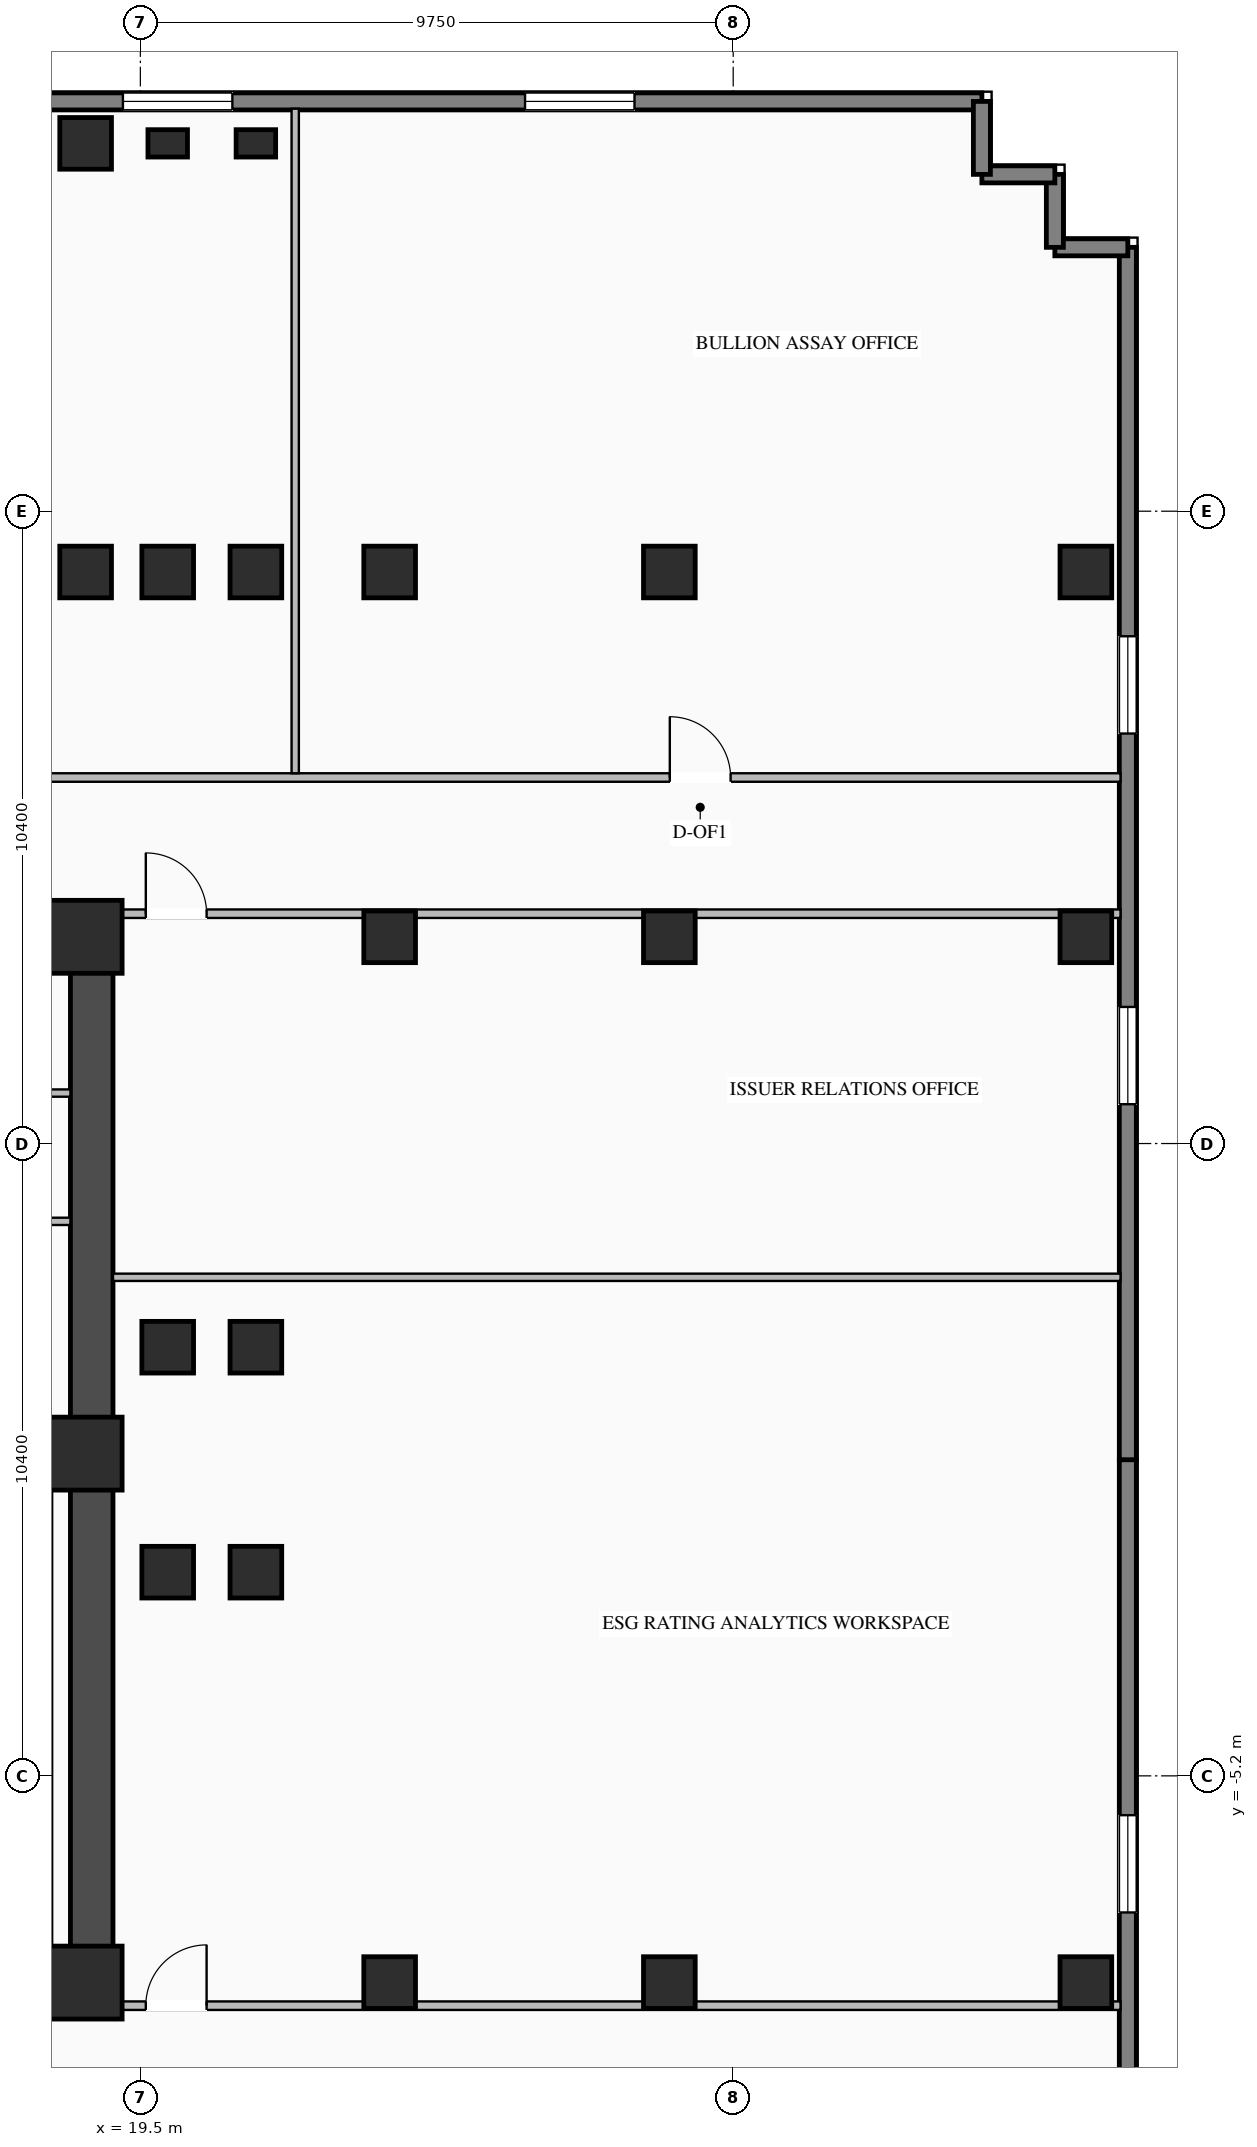
"""IFC4 building model, lengths in metres.
Left out: names, types, materials, properties, quantities, classifications, styles, units other than length and angle.
Written with IfcOpenShell. Run it as: python <this file> out.ifc"""

import sys

from ifc_helpers import new_model, si_unit, direction, frame, frame_2d, origin, origin_2d, place, context, subcontext, project, spatial, rectangle, i_section, extrude, element, fill, save


model = new_model("IFC4")
c1 = context("Model", 3, precision=1e-05, world=origin(), true_north=direction((0.0, 1.0)))
c2 = subcontext(c1, "Body", "Model", "MODEL_VIEW")
j1 = project(units=[si_unit("LENGTHUNIT", "METRE"), si_unit("PLANEANGLEUNIT", "RADIAN")], contexts=[c1])
p1 = place(None, origin())
s1 = spatial("IfcSite", under=j1, at=p1, CompositionType="ELEMENT")
p2 = place(p1, origin())
s2 = spatial("IfcBuilding", under=s1, at=p2, CompositionType="ELEMENT")
p3 = place(p2, frame((0.0, 0.0, 41.55)))
s3 = spatial("IfcBuildingStorey", under=s2, at=p3, CompositionType="ELEMENT", Elevation=41.55)
p4 = place(p3, frame((8.8, -8.7, 0.0), z_axis=(0.0, 0.0, 1.0), x_axis=(1.0, 0.0, 0.0)))
e1 = element("IfcWall", 1, at=p4, inside=s3, PredefinedType="SHEAR", context=c2, shape_type="SweptSolid", body=[
    extrude(rectangle(XDim=10.25, YDim=0.7, at=frame_2d((5.125, 0.0))), origin(), (0.0, 0.0, 1.0), 3.27),
])
p5 = place(p3, frame((8.8, 8.7, 0.0), z_axis=(0.0, 0.0, 1.0), x_axis=(1.0, 0.0, 0.0)))
e2 = element("IfcWall", 2, at=p5, inside=s3, PredefinedType="SHEAR", context=c2, shape_type="SweptSolid", body=[
    extrude(rectangle(XDim=10.25, YDim=0.7, at=frame_2d((5.125, 0.0))), origin(), (0.0, 0.0, 1.0), 3.27),
])
p6 = place(p5, frame((3.25, 0.0, 0.0)))
e3 = element("IfcOpeningElement", 3, at=p6, cuts=e2, PredefinedType="OPENING", context=c2, shape_type="SweptSolid", body=[
    extrude(rectangle(XDim=1.4, YDim=2.05, at=frame_2d((0.7, 1.025))), frame((0.0, 0.36, 0.0), z_axis=(0.0, -1.0, 0.0), x_axis=(1.0, 0.0, 0.0)), (0.0, 0.0, 1.0), 0.72),
])
p7 = place(p3, frame((18.7, -8.35, 0.0), z_axis=(0.0, 0.0, 1.0), x_axis=(0.0, 1.0, 0.0)))
e4 = element("IfcWall", 4, at=p7, inside=s3, PredefinedType="SHEAR", context=c2, shape_type="SweptSolid", body=[
    extrude(rectangle(XDim=16.7, YDim=0.7, at=frame_2d((8.35, 0.0))), origin(), (0.0, 0.0, 1.0), 3.27),
])
for number, where, z_axis, x_axis in (
    (5, (18.6, -8.6, 0.0), (0.0, 0.0, 1.0), (1.0, 0.0, 0.0)),
    (6, (18.6, 0.1, 0.0), (0.0, 0.0, 1.0), (1.0, 0.0, 0.0)),
    (7, (18.6, 8.6, 0.0), (0.0, 0.0, 1.0), (1.0, 0.0, 0.0)),
):
    element("IfcColumn", number, at=place(p3, frame(where, z_axis=z_axis, x_axis=x_axis)), inside=s3, PredefinedType="COLUMN", context=c2, shape_type="SweptSolid", body=[
        extrude(rectangle(XDim=1.2, YDim=1.2, at=origin_2d()), origin(), (0.0, 0.0, 1.0), 3.45),
    ])
for number, where, z_axis, x_axis in (
    (8, (18.6, 14.6, 0.0), (0.0, 0.0, 1.0), (1.0, 0.0, 0.0)),
    (9, (19.95, 14.6, 0.0), (0.0, 0.0, 1.0), (1.0, 0.0, 0.0)),
    (10, (21.4, 14.6, 0.0), (0.0, 0.0, 1.0), (1.0, 0.0, 0.0)),
    (11, (19.95, -1.85, 0.0), (0.0, 0.0, 1.0), (1.0, 0.0, 0.0)),
    (12, (19.95, 1.85, 0.0), (0.0, 0.0, 1.0), (1.0, 0.0, 0.0)),
    (13, (21.4, -1.85, 0.0), (0.0, 0.0, 1.0), (1.0, 0.0, 0.0)),
    (14, (21.4, 1.85, 0.0), (0.0, 0.0, 1.0), (1.0, 0.0, 0.0)),
    (15, (23.6, -8.6, 0.0), (0.0, 0.0, 1.0), (1.0, 0.0, 0.0)),
    (16, (23.6, 8.6, 0.0), (0.0, 0.0, 1.0), (1.0, 0.0, 0.0)),
    (17, (23.6, 14.6, 0.0), (0.0, 0.0, 1.0), (1.0, 0.0, 0.0)),
    (18, (28.2, -8.6, 0.0), (0.0, 0.0, 1.0), (1.0, 0.0, 0.0)),
    (19, (28.2, 8.6, 0.0), (0.0, 0.0, 1.0), (1.0, 0.0, 0.0)),
    (20, (28.2, 14.6, 0.0), (0.0, 0.0, 1.0), (1.0, 0.0, 0.0)),
    (21, (18.6, 21.65, 0.0), (0.0, 0.0, 1.0), (1.0, 0.0, 0.0)),
    (22, (35.05, -8.6, 0.0), (0.0, 0.0, 1.0), (1.0, 0.0, 0.0)),
    (23, (35.05, 8.6, 0.0), (0.0, 0.0, 1.0), (1.0, 0.0, 0.0)),
    (24, (35.05, 14.6, 0.0), (0.0, 0.0, 1.0), (1.0, 0.0, 0.0)),
):
    element("IfcColumn", number, at=place(p3, frame(where, z_axis=z_axis, x_axis=x_axis)), inside=s3, PredefinedType="COLUMN", context=c2, shape_type="SweptSolid", body=[
        extrude(i_section(OverallWidth=0.85, OverallDepth=0.85, WebThickness=0.032, FlangeThickness=0.048, at=origin_2d()), origin(), (0.0, 0.0, 1.0), 3.45),
    ])
for number, where, z_axis, x_axis in (
    (25, (19.95, 21.65, 0.0), (0.0, 0.0, 1.0), (1.0, 0.0, 0.0)),
    (26, (21.4, 21.65, 0.0), (0.0, 0.0, 1.0), (1.0, 0.0, 0.0)),
):
    element("IfcColumn", number, at=place(p3, frame(where, z_axis=z_axis, x_axis=x_axis)), inside=s3, PredefinedType="PILASTER", context=c2, shape_type="SweptSolid", body=[
        extrude(rectangle(XDim=0.65, YDim=0.45, at=origin_2d()), origin(), (0.0, 0.0, 1.0), 3.45),
    ])
p8 = place(p3, frame((13.5, 22.34, 0.0), z_axis=(0.0, 0.0, 1.0), x_axis=(1.0, 0.0, 0.0)))
e27 = element("IfcWall", 27, at=p8, inside=s3, PredefinedType="STANDARD", context=c2, shape_type="SweptSolid", body=[
    extrude(rectangle(XDim=19.84, YDim=0.28, at=frame_2d((9.92, 0.0))), origin(), (0.0, 0.0, 1.0), 3.25),
])
p9 = place(p8, frame((5.713, 0.0, 0.76)))
e28 = element("IfcOpeningElement", 28, at=p9, cuts=e27, PredefinedType="OPENING", context=c2, shape_type="SweptSolid", body=[
    extrude(rectangle(XDim=1.8, YDim=1.95, at=frame_2d((0.9, 0.975))), frame((0.0, 0.15, 0.0), z_axis=(0.0, -1.0, 0.0), x_axis=(1.0, 0.0, 0.0)), (0.0, 0.0, 1.0), 0.3),
])
p10 = place(p8, frame((12.327, 0.0, 0.76)))
e29 = element("IfcOpeningElement", 29, at=p10, cuts=e27, PredefinedType="OPENING", context=c2, shape_type="SweptSolid", body=[
    extrude(rectangle(XDim=1.8, YDim=1.95, at=frame_2d((0.9, 0.975))), frame((0.0, 0.15, 0.0), z_axis=(0.0, -1.0, 0.0), x_axis=(1.0, 0.0, 0.0)), (0.0, 0.0, 1.0), 0.3),
])
p11 = place(p3, frame((35.74, 0.0, 0.0), z_axis=(0.0, 0.0, 1.0), x_axis=(0.0, -1.0, 0.0)))
e30 = element("IfcWall", 30, at=p11, inside=s3, PredefinedType="STANDARD", context=c2, shape_type="SweptSolid", body=[
    extrude(rectangle(XDim=19.94, YDim=0.28, at=frame_2d((9.97, 0.0))), origin(), (0.0, 0.0, 1.0), 3.25),
])
p12 = place(p11, frame((5.847, 0.0, 0.76)))
e31 = element("IfcOpeningElement", 31, at=p12, cuts=e30, PredefinedType="OPENING", context=c2, shape_type="SweptSolid", body=[
    extrude(rectangle(XDim=1.6, YDim=1.95, at=frame_2d((0.8, 0.975))), frame((0.0, 0.15, 0.0), z_axis=(0.0, -1.0, 0.0), x_axis=(1.0, 0.0, 0.0)), (0.0, 0.0, 1.0), 0.3),
])
p13 = place(p11, frame((11.943, 0.0, 0.76)))
e32 = element("IfcOpeningElement", 32, at=p13, cuts=e30, PredefinedType="OPENING", context=c2, shape_type="SweptSolid", body=[
    extrude(rectangle(XDim=1.6, YDim=1.95, at=frame_2d((0.8, 0.975))), frame((0.0, 0.15, 0.0), z_axis=(0.0, -1.0, 0.0), x_axis=(1.0, 0.0, 0.0)), (0.0, 0.0, 1.0), 0.3),
])
p14 = place(p3, frame((35.74, 19.94, 0.0), z_axis=(0.0, 0.0, 1.0), x_axis=(0.0, -1.0, 0.0)))
e33 = element("IfcWall", 33, at=p14, inside=s3, PredefinedType="STANDARD", context=c2, shape_type="SweptSolid", body=[
    extrude(rectangle(XDim=19.94, YDim=0.28, at=frame_2d((9.97, 0.0))), origin(), (0.0, 0.0, 1.0), 3.25),
])
p15 = place(p14, frame((6.397, 0.0, 0.76)))
e34 = element("IfcOpeningElement", 34, at=p15, cuts=e33, PredefinedType="OPENING", context=c2, shape_type="SweptSolid", body=[
    extrude(rectangle(XDim=1.6, YDim=1.95, at=frame_2d((0.8, 0.975))), frame((0.0, 0.15, 0.0), z_axis=(0.0, -1.0, 0.0), x_axis=(1.0, 0.0, 0.0)), (0.0, 0.0, 1.0), 0.3),
])
p16 = place(p14, frame((12.493, 0.0, 0.76)))
e35 = element("IfcOpeningElement", 35, at=p16, cuts=e33, PredefinedType="OPENING", context=c2, shape_type="SweptSolid", body=[
    extrude(rectangle(XDim=1.6, YDim=1.95, at=frame_2d((0.8, 0.975))), frame((0.0, 0.15, 0.0), z_axis=(0.0, -1.0, 0.0), x_axis=(1.0, 0.0, 0.0)), (0.0, 0.0, 1.0), 0.3),
])
for number, where, z_axis, x_axis in (
    (36, (35.74, 19.94, 0.0), (0.0, 0.0, 1.0), (-1.0, 0.0, 0.0)),
    (37, (34.54, 19.94, 0.0), (0.0, 0.0, 1.0), (0.0, 1.0, 0.0)),
    (38, (34.54, 21.14, 0.0), (0.0, 0.0, 1.0), (-1.0, 0.0, 0.0)),
):
    element("IfcWall", number, at=place(p3, frame(where, z_axis=z_axis, x_axis=x_axis)), inside=s3, PredefinedType="STANDARD", context=c2, shape_type="SweptSolid", body=[
        extrude(rectangle(XDim=1.2, YDim=0.28, at=frame_2d((0.6, 0.0))), origin(), (0.0, 0.0, 1.0), 3.25),
    ])
p17 = place(p3, frame((33.34, 21.14, 0.0), z_axis=(0.0, 0.0, 1.0), x_axis=(0.0, 1.0, 0.0)))
e39 = element("IfcWall", 39, at=p17, inside=s3, PredefinedType="STANDARD", context=c2, shape_type="SweptSolid", body=[
    extrude(rectangle(XDim=1.2, YDim=0.28, at=frame_2d((0.6, 0.0))), origin(), (0.0, 0.0, 1.0), 3.25),
])
p18 = place(p3, frame((13.9, 3.92, 0.0), z_axis=(0.0, 0.0, 1.0), x_axis=(1.0, 0.0, 0.0)))
e40 = element("IfcWall", 40, at=p18, inside=s3, PredefinedType="STANDARD", context=c2, shape_type="SweptSolid", body=[
    extrude(rectangle(XDim=4.45, YDim=0.12, at=frame_2d((2.225, 0.0))), origin(), (0.0, 0.0, 1.0), 3.25),
])
p19 = place(p3, frame((16.15, 6.03, 0.0), z_axis=(0.0, 0.0, 1.0), x_axis=(1.0, 0.0, 0.0)))
e41 = element("IfcWall", 41, at=p19, inside=s3, PredefinedType="STANDARD", context=c2, shape_type="SweptSolid", body=[
    extrude(rectangle(XDim=2.2, YDim=0.12, at=frame_2d((1.1, 0.0))), origin(), (0.0, 0.0, 1.0), 3.25),
])
p20 = place(p3, frame((-35.62, 11.22, 0.0), z_axis=(0.0, 0.0, 1.0), x_axis=(1.0, 0.0, 0.0)))
e42 = element("IfcWall", 42, at=p20, inside=s3, PredefinedType="STANDARD", context=c2, shape_type="SweptSolid", body=[
    extrude(rectangle(XDim=71.24, YDim=0.14, at=frame_2d((35.62, 0.0))), origin(), (0.0, 0.0, 1.0), 3.25),
])
p21 = place(p20, frame((5.701, 0.0, 0.0)))
e43 = element("IfcOpeningElement", 43, at=p21, cuts=e42, PredefinedType="OPENING", context=c2, shape_type="SweptSolid", body=[
    extrude(rectangle(XDim=1.0, YDim=2.08, at=frame_2d((0.5, 1.04))), frame((0.0, 0.08, 0.0), z_axis=(0.0, -1.0, 0.0), x_axis=(1.0, 0.0, 0.0)), (0.0, 0.0, 1.0), 0.16),
])
p22 = place(p20, frame((18.762, 0.0, 0.0)))
e44 = element("IfcOpeningElement", 44, at=p22, cuts=e42, PredefinedType="OPENING", context=c2, shape_type="SweptSolid", body=[
    extrude(rectangle(XDim=1.0, YDim=2.08, at=frame_2d((0.5, 1.04))), frame((0.0, 0.08, 0.0), z_axis=(0.0, -1.0, 0.0), x_axis=(1.0, 0.0, 0.0)), (0.0, 0.0, 1.0), 0.16),
])
p23 = place(p20, frame((33.698, 0.0, 0.0)))
e45 = element("IfcOpeningElement", 45, at=p23, cuts=e42, PredefinedType="OPENING", context=c2, shape_type="SweptSolid", body=[
    extrude(rectangle(XDim=1.0, YDim=2.08, at=frame_2d((0.5, 1.04))), frame((0.0, 0.08, 0.0), z_axis=(0.0, -1.0, 0.0), x_axis=(1.0, 0.0, 0.0)), (0.0, 0.0, 1.0), 0.16),
])
p24 = place(p20, frame((49.344, 0.0, 0.0)))
e46 = element("IfcOpeningElement", 46, at=p24, cuts=e42, PredefinedType="OPENING", context=c2, shape_type="SweptSolid", body=[
    extrude(rectangle(XDim=1.0, YDim=2.08, at=frame_2d((0.5, 1.04))), frame((0.0, 0.08, 0.0), z_axis=(0.0, -1.0, 0.0), x_axis=(1.0, 0.0, 0.0)), (0.0, 0.0, 1.0), 0.16),
])
p25 = place(p20, frame((63.827, 0.0, 0.0)))
e47 = element("IfcOpeningElement", 47, at=p25, cuts=e42, PredefinedType="OPENING", context=c2, shape_type="SweptSolid", body=[
    extrude(rectangle(XDim=1.0, YDim=2.08, at=frame_2d((0.5, 1.04))), frame((0.0, 0.08, 0.0), z_axis=(0.0, -1.0, 0.0), x_axis=(1.0, 0.0, 0.0)), (0.0, 0.0, 1.0), 0.16),
])
p26 = place(p3, frame((22.047, 11.29, 0.0), z_axis=(0.0, 0.0, 1.0), x_axis=(0.0, 1.0, 0.0)))
e48 = element("IfcWall", 48, at=p26, inside=s3, PredefinedType="STANDARD", context=c2, shape_type="SweptSolid", body=[
    extrude(rectangle(XDim=10.93, YDim=0.12, at=frame_2d((5.465, 0.0))), origin(), (0.0, 0.0, 1.0), 3.25),
])
p27 = place(p3, frame((19.05, 8.98, 0.0), z_axis=(0.0, 0.0, 1.0), x_axis=(1.0, 0.0, 0.0)))
e49 = element("IfcWall", 49, at=p27, inside=s3, PredefinedType="STANDARD", context=c2, shape_type="SweptSolid", body=[
    extrude(rectangle(XDim=16.57, YDim=0.14, at=frame_2d((8.285, 0.0))), origin(), (0.0, 0.0, 1.0), 3.25),
])
p28 = place(p27, frame((0.54, 0.0, 0.0)))
e50 = element("IfcOpeningElement", 50, at=p28, cuts=e49, PredefinedType="OPENING", context=c2, shape_type="SweptSolid", body=[
    extrude(rectangle(XDim=1.0, YDim=2.08, at=frame_2d((0.5, 1.04))), frame((0.0, 0.08, 0.0), z_axis=(0.0, -1.0, 0.0), x_axis=(1.0, 0.0, 0.0)), (0.0, 0.0, 1.0), 0.16),
])
p29 = place(p3, frame((19.05, -8.98, 0.0), z_axis=(0.0, 0.0, 1.0), x_axis=(1.0, 0.0, 0.0)))
e51 = element("IfcWall", 51, at=p29, inside=s3, PredefinedType="STANDARD", context=c2, shape_type="SweptSolid", body=[
    extrude(rectangle(XDim=16.57, YDim=0.14, at=frame_2d((8.285, 0.0))), origin(), (0.0, 0.0, 1.0), 3.25),
])
p30 = place(p29, frame((0.54, 0.0, 0.0)))
e52 = element("IfcOpeningElement", 52, at=p30, cuts=e51, PredefinedType="OPENING", context=c2, shape_type="SweptSolid", body=[
    extrude(rectangle(XDim=1.0, YDim=2.08, at=frame_2d((0.5, 1.04))), frame((0.0, 0.08, 0.0), z_axis=(0.0, -1.0, 0.0), x_axis=(1.0, 0.0, 0.0)), (0.0, 0.0, 1.0), 0.16),
])
p31 = place(p3, frame((19.05, 3.0, 0.0), z_axis=(0.0, 0.0, 1.0), x_axis=(1.0, 0.0, 0.0)))
e53 = element("IfcWall", 53, at=p31, inside=s3, PredefinedType="STANDARD", context=c2, shape_type="SweptSolid", body=[
    extrude(rectangle(XDim=16.57, YDim=0.12, at=frame_2d((8.285, 0.0))), origin(), (0.0, 0.0, 1.0), 3.25),
])
p32 = place(p9, origin())
e54 = element("IfcWindow", 54, at=p32, inside=s3, PartitioningType="SINGLE_PANEL", PredefinedType="WINDOW", context=c2, shape_type="SweptSolid", body=[
    extrude(rectangle(XDim=1.8, YDim=1.95, at=frame_2d((0.9, 0.975))), frame((0.0, 0.03, 0.0), z_axis=(0.0, -1.0, 0.0), x_axis=(1.0, 0.0, 0.0)), (0.0, 0.0, 1.0), 0.06),
])
fill(e28, e54)
p33 = place(p10, origin())
e55 = element("IfcWindow", 55, at=p33, inside=s3, PartitioningType="SINGLE_PANEL", PredefinedType="WINDOW", context=c2, shape_type="SweptSolid", body=[
    extrude(rectangle(XDim=1.8, YDim=1.95, at=frame_2d((0.9, 0.975))), frame((0.0, 0.03, 0.0), z_axis=(0.0, -1.0, 0.0), x_axis=(1.0, 0.0, 0.0)), (0.0, 0.0, 1.0), 0.06),
])
fill(e29, e55)
p34 = place(p12, origin())
e56 = element("IfcWindow", 56, at=p34, inside=s3, PartitioningType="SINGLE_PANEL", PredefinedType="WINDOW", context=c2, shape_type="SweptSolid", body=[
    extrude(rectangle(XDim=1.6, YDim=1.95, at=frame_2d((0.8, 0.975))), frame((0.0, 0.03, 0.0), z_axis=(0.0, -1.0, 0.0), x_axis=(1.0, 0.0, 0.0)), (0.0, 0.0, 1.0), 0.06),
])
fill(e31, e56)
p35 = place(p15, origin())
e57 = element("IfcWindow", 57, at=p35, inside=s3, PartitioningType="SINGLE_PANEL", PredefinedType="WINDOW", context=c2, shape_type="SweptSolid", body=[
    extrude(rectangle(XDim=1.6, YDim=1.95, at=frame_2d((0.8, 0.975))), frame((0.0, 0.03, 0.0), z_axis=(0.0, -1.0, 0.0), x_axis=(1.0, 0.0, 0.0)), (0.0, 0.0, 1.0), 0.06),
])
fill(e34, e57)
p36 = place(p16, origin())
e58 = element("IfcWindow", 58, at=p36, inside=s3, PartitioningType="SINGLE_PANEL", PredefinedType="WINDOW", context=c2, shape_type="SweptSolid", body=[
    extrude(rectangle(XDim=1.6, YDim=1.95, at=frame_2d((0.8, 0.975))), frame((0.0, 0.03, 0.0), z_axis=(0.0, -1.0, 0.0), x_axis=(1.0, 0.0, 0.0)), (0.0, 0.0, 1.0), 0.06),
])
fill(e35, e58)
p37 = place(p25, origin())
e59 = element("IfcDoor", 59, at=p37, inside=s3, OperationType="SINGLE_SWING_LEFT", PredefinedType="DOOR", context=c2, shape_type="SweptSolid", body=[
    extrude(rectangle(XDim=1.0, YDim=2.08, at=frame_2d((0.5, 1.04))), frame((0.0, 0.025, 0.0), z_axis=(0.0, -1.0, 0.0), x_axis=(1.0, 0.0, 0.0)), (0.0, 0.0, 1.0), 0.05),
])
fill(e47, e59)
p38 = place(p28, origin())
e60 = element("IfcDoor", 60, at=p38, inside=s3, OperationType="SINGLE_SWING_LEFT", PredefinedType="DOOR", context=c2, shape_type="SweptSolid", body=[
    extrude(rectangle(XDim=1.0, YDim=2.08, at=frame_2d((0.5, 1.04))), frame((0.0, 0.025, 0.0), z_axis=(0.0, -1.0, 0.0), x_axis=(1.0, 0.0, 0.0)), (0.0, 0.0, 1.0), 0.05),
])
fill(e50, e60)
p39 = place(p30, origin())
e61 = element("IfcDoor", 61, at=p39, inside=s3, OperationType="SINGLE_SWING_RIGHT", PredefinedType="DOOR", context=c2, shape_type="SweptSolid", body=[
    extrude(rectangle(XDim=1.0, YDim=2.08, at=frame_2d((0.5, 1.04))), frame((0.0, 0.025, 0.0), z_axis=(0.0, -1.0, 0.0), x_axis=(1.0, 0.0, 0.0)), (0.0, 0.0, 1.0), 0.05),
])
fill(e52, e61)
save(model, sys.argv[1])
